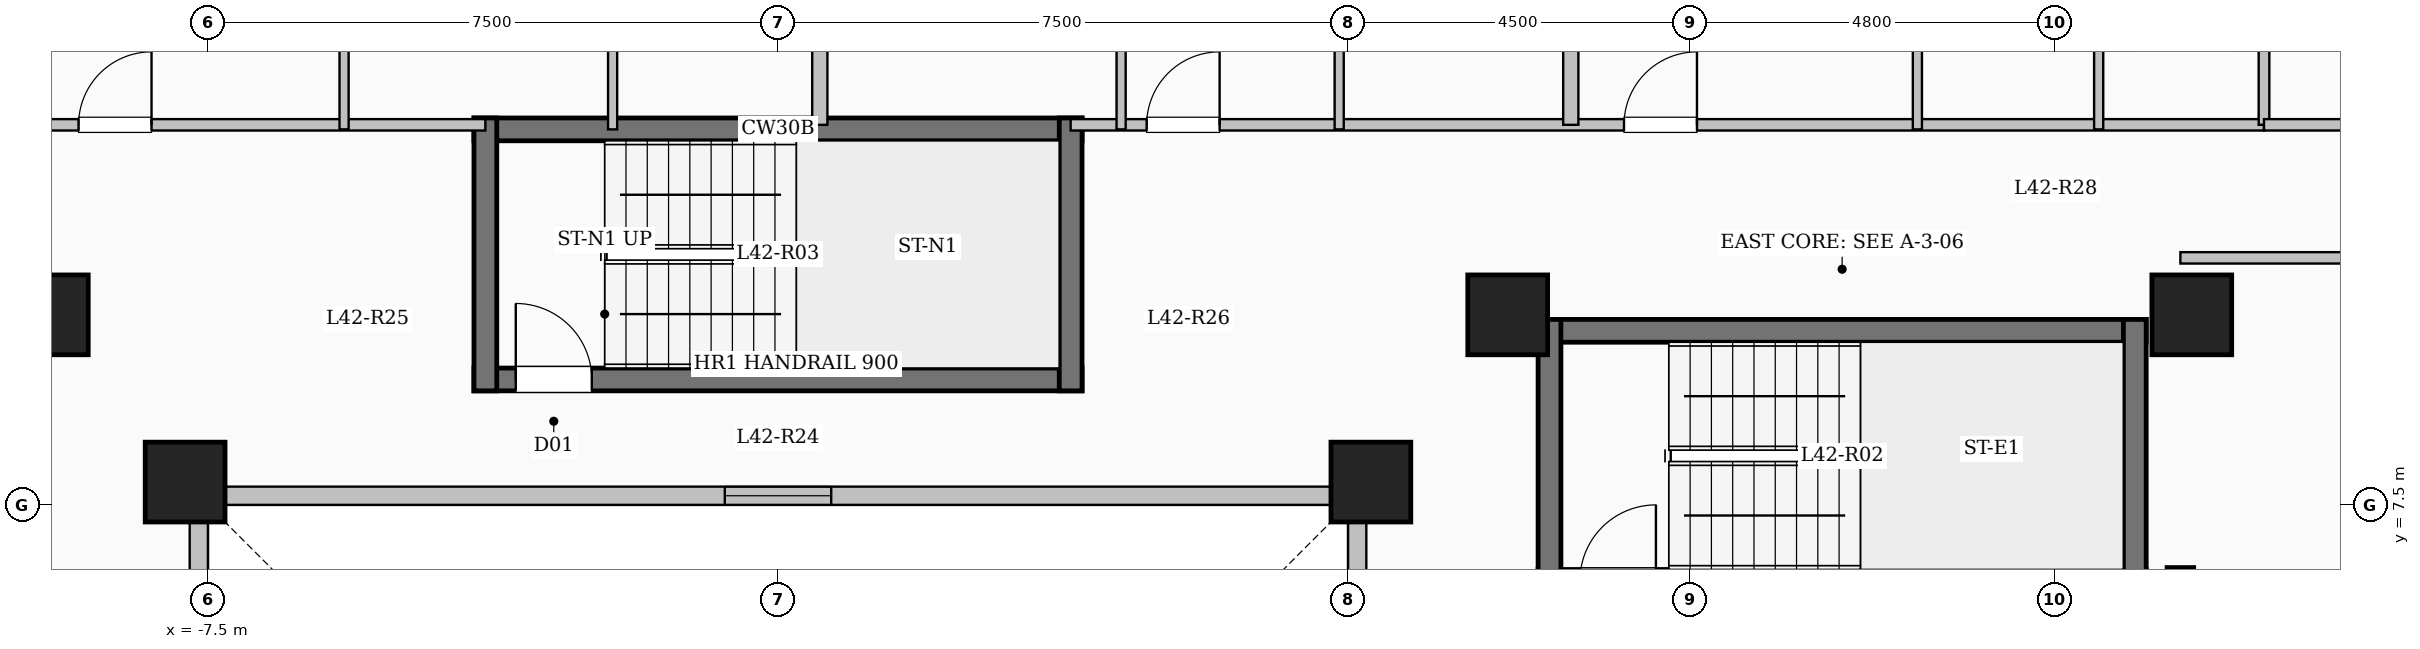
"""IFC4 building model, lengths in metres.
Left out: names, types, materials, properties, quantities, classifications, styles, units other than length and angle.
Written with IfcOpenShell. Run it as: python <this file> out.ifc"""

import sys

from ifc_helpers import new_model, si_unit, direction, frame, frame_2d, origin, origin_2d, place, context, subcontext, project, spatial, rectangle, extrude, element, fill, save


model = new_model("IFC4")
c1 = context("Model", 3, precision=1e-05, world=origin(), true_north=direction((0.0, 1.0)))
c2 = subcontext(c1, "Body", "Model", "MODEL_VIEW")
j1 = project(units=[si_unit("LENGTHUNIT", "METRE"), si_unit("PLANEANGLEUNIT", "RADIAN")], contexts=[c1])
p1 = place(None, origin())
s1 = spatial("IfcSite", under=j1, at=p1, CompositionType="ELEMENT")
p2 = place(p1, origin())
s2 = spatial("IfcBuilding", under=s1, at=p2, CompositionType="ELEMENT")
p3 = place(p2, frame((0.0, 0.0, 156.05)))
s3 = spatial("IfcBuildingStorey", under=s2, at=p3, CompositionType="ELEMENT", Elevation=156.05)
for number, where, z_axis, x_axis in (
    (1, (-7.8, 7.8, 0.0), (0.0, 0.0, 1.0), (1.0, 0.0, 0.0)),
    (2, (7.8, 7.8, 0.0), (0.0, 0.0, 1.0), (1.0, 0.0, 0.0)),
    (3, (-9.6, 10.0, 0.0), (0.0, 0.0, 1.0), (1.0, 0.0, 0.0)),
    (4, (9.6, 10.0, 0.0), (0.0, 0.0, 1.0), (1.0, 0.0, 0.0)),
    (5, (18.6, 10.0, 0.0), (0.0, 0.0, 1.0), (1.0, 0.0, 0.0)),
):
    element("IfcColumn", number, at=place(p3, frame(where, z_axis=z_axis, x_axis=x_axis)), inside=s3, PredefinedType="COLUMN", context=c2, shape_type="SweptSolid", body=[
        extrude(rectangle(XDim=1.05, YDim=1.05, at=origin_2d()), origin(), (0.0, 0.0, 1.0), 3.35),
    ])
p4 = place(p3, frame((7.62, -7.62, 0.0), z_axis=(0.0, 0.0, 1.0), x_axis=(0.0, 1.0, 0.0)))
e6 = element("IfcWall", 6, at=p4, inside=s3, PredefinedType="SOLIDWALL", context=c2, shape_type="SweptSolid", body=[
    extrude(rectangle(XDim=15.24, YDim=0.24, at=frame_2d((7.62, 0.0))), origin(), (0.0, 0.0, 1.0), 3.1),
])
p5 = place(p4, frame((6.92, 0.0, 0.95)))
e7 = element("IfcOpeningElement", 7, at=p5, cuts=e6, PredefinedType="OPENING", context=c2, shape_type="SweptSolid", body=[
    extrude(rectangle(XDim=1.4, YDim=1.5, at=frame_2d((0.7, 0.75))), frame((0.0, 0.13, 0.0), z_axis=(0.0, -1.0, 0.0), x_axis=(1.0, 0.0, 0.0)), (0.0, 0.0, 1.0), 0.26),
])
p6 = place(p3, frame((7.62, 7.62, 0.0), z_axis=(0.0, 0.0, 1.0), x_axis=(-1.0, 0.0, 0.0)))
e8 = element("IfcWall", 8, at=p6, inside=s3, PredefinedType="SOLIDWALL", context=c2, shape_type="SweptSolid", body=[
    extrude(rectangle(XDim=15.24, YDim=0.24, at=frame_2d((7.62, 0.0))), origin(), (0.0, 0.0, 1.0), 3.1),
])
p7 = place(p6, frame((6.92, 0.0, 0.95)))
e9 = element("IfcOpeningElement", 9, at=p7, cuts=e8, PredefinedType="OPENING", context=c2, shape_type="SweptSolid", body=[
    extrude(rectangle(XDim=1.4, YDim=1.5, at=frame_2d((0.7, 0.75))), frame((0.0, 0.13, 0.0), z_axis=(0.0, -1.0, 0.0), x_axis=(1.0, 0.0, 0.0)), (0.0, 0.0, 1.0), 0.26),
])
p8 = place(p3, frame((-7.62, 7.62, 0.0), z_axis=(0.0, 0.0, 1.0), x_axis=(0.0, -1.0, 0.0)))
e10 = element("IfcWall", 10, at=p8, inside=s3, PredefinedType="SOLIDWALL", context=c2, shape_type="SweptSolid", body=[
    extrude(rectangle(XDim=15.24, YDim=0.24, at=frame_2d((7.62, 0.0))), origin(), (0.0, 0.0, 1.0), 3.1),
])
p9 = place(p8, frame((6.92, 0.0, 0.95)))
e11 = element("IfcOpeningElement", 11, at=p9, cuts=e10, PredefinedType="OPENING", context=c2, shape_type="SweptSolid", body=[
    extrude(rectangle(XDim=1.4, YDim=1.5, at=frame_2d((0.7, 0.75))), frame((0.0, 0.13, 0.0), z_axis=(0.0, -1.0, 0.0), x_axis=(1.0, 0.0, 0.0)), (0.0, 0.0, 1.0), 0.26),
])
p10 = place(p3, frame((10.0, 9.79, 0.0), z_axis=(0.0, 0.0, 1.0), x_axis=(1.0, 0.0, 0.0)))
e12 = element("IfcWall", 12, at=p10, inside=s3, PredefinedType="SHEAR", context=c2, shape_type="SweptSolid", body=[
    extrude(rectangle(XDim=8.0, YDim=0.3, at=frame_2d((4.0, 0.0))), origin(), (0.0, 0.0, 1.0), 3.35),
])
p11 = place(p3, frame((10.0, 6.5, 0.0), z_axis=(0.0, 0.0, 1.0), x_axis=(1.0, 0.0, 0.0)))
e13 = element("IfcWall", 13, at=p11, inside=s3, PredefinedType="SHEAR", context=c2, shape_type="SweptSolid", body=[
    extrude(rectangle(XDim=8.0, YDim=0.3, at=frame_2d((4.0, 0.0))), origin(), (0.0, 0.0, 1.0), 3.35),
])
p12 = place(p11, frame((0.55, 0.0, 0.0)))
e14 = element("IfcOpeningElement", 14, at=p12, cuts=e13, PredefinedType="OPENING", context=c2, shape_type="SweptSolid", body=[
    extrude(rectangle(XDim=1.0, YDim=2.15, at=frame_2d((0.5, 1.075))), frame((0.0, 0.16, 0.0), z_axis=(0.0, -1.0, 0.0), x_axis=(1.0, 0.0, 0.0)), (0.0, 0.0, 1.0), 0.32),
])
for number, where, z_axis, x_axis in (
    (15, (10.15, 6.35, 0.0), (0.0, 0.0, 1.0), (0.0, 1.0, 0.0)),
    (16, (17.85, 6.35, 0.0), (0.0, 0.0, 1.0), (0.0, 1.0, 0.0)),
):
    element("IfcWall", number, at=place(p3, frame(where, z_axis=z_axis, x_axis=x_axis)), inside=s3, PredefinedType="SHEAR", context=c2, shape_type="SweptSolid", body=[
        extrude(rectangle(XDim=3.59, YDim=0.3, at=frame_2d((1.795, 0.0))), origin(), (0.0, 0.0, 1.0), 3.35),
    ])
p13 = place(p3, frame((-4.0, 12.44, 0.0), z_axis=(0.0, 0.0, 1.0), x_axis=(1.0, 0.0, 0.0)))
e17 = element("IfcWall", 17, at=p13, inside=s3, PredefinedType="SHEAR", context=c2, shape_type="SweptSolid", body=[
    extrude(rectangle(XDim=8.0, YDim=0.3, at=frame_2d((4.0, 0.0))), origin(), (0.0, 0.0, 1.0), 3.35),
])
p14 = place(p3, frame((-4.0, 9.15, 0.0), z_axis=(0.0, 0.0, 1.0), x_axis=(1.0, 0.0, 0.0)))
e18 = element("IfcWall", 18, at=p14, inside=s3, PredefinedType="SHEAR", context=c2, shape_type="SweptSolid", body=[
    extrude(rectangle(XDim=8.0, YDim=0.3, at=frame_2d((4.0, 0.0))), origin(), (0.0, 0.0, 1.0), 3.35),
])
p15 = place(p14, frame((0.55, 0.0, 0.0)))
e19 = element("IfcOpeningElement", 19, at=p15, cuts=e18, PredefinedType="OPENING", context=c2, shape_type="SweptSolid", body=[
    extrude(rectangle(XDim=1.0, YDim=2.15, at=frame_2d((0.5, 1.075))), frame((0.0, 0.16, 0.0), z_axis=(0.0, -1.0, 0.0), x_axis=(1.0, 0.0, 0.0)), (0.0, 0.0, 1.0), 0.32),
])
for number, where, z_axis, x_axis in (
    (20, (-3.85, 9.0, 0.0), (0.0, 0.0, 1.0), (0.0, 1.0, 0.0)),
    (21, (3.85, 9.0, 0.0), (0.0, 0.0, 1.0), (0.0, 1.0, 0.0)),
):
    element("IfcWall", number, at=place(p3, frame(where, z_axis=z_axis, x_axis=x_axis)), inside=s3, PredefinedType="SHEAR", context=c2, shape_type="SweptSolid", body=[
        extrude(rectangle(XDim=3.59, YDim=0.3, at=frame_2d((1.795, 0.0))), origin(), (0.0, 0.0, 1.0), 3.35),
    ])
p16 = place(p3, frame((18.45, -7.375, 0.0), z_axis=(0.0, 0.0, 1.0), x_axis=(0.0, 1.0, 0.0)))
e22 = element("IfcWall", 22, at=p16, inside=s3, PredefinedType="SHEAR", context=c2, shape_type="SweptSolid", body=[
    extrude(rectangle(XDim=14.05, YDim=0.35, at=frame_2d((7.025, 0.0))), origin(), (0.0, 0.0, 1.0), 3.35),
])
p17 = place(p3, frame((-19.55, 12.5, 0.0), z_axis=(0.0, 0.0, 1.0), x_axis=(1.0, 0.0, 0.0)))
e23 = element("IfcWall", 23, at=p17, inside=s3, PredefinedType="PARTITIONING", context=c2, shape_type="SweptSolid", body=[
    extrude(rectangle(XDim=15.7, YDim=0.15, at=frame_2d((7.85, 0.0))), origin(), (0.0, 0.0, 1.0), 3.1),
])
p18 = place(p17, frame((0.7, 0.0, 0.0)))
e24 = element("IfcOpeningElement", 24, at=p18, cuts=e23, PredefinedType="OPENING", context=c2, shape_type="SweptSolid", body=[
    extrude(rectangle(XDim=0.96, YDim=2.15, at=frame_2d((0.48, 1.075))), frame((0.0, 0.085, 0.0), z_axis=(0.0, -1.0, 0.0), x_axis=(1.0, 0.0, 0.0)), (0.0, 0.0, 1.0), 0.17),
])
p19 = place(p17, frame((10.348, 0.0, 0.0)))
e25 = element("IfcOpeningElement", 25, at=p19, cuts=e23, PredefinedType="OPENING", context=c2, shape_type="SweptSolid", body=[
    extrude(rectangle(XDim=0.96, YDim=2.15, at=frame_2d((0.48, 1.075))), frame((0.0, 0.085, 0.0), z_axis=(0.0, -1.0, 0.0), x_axis=(1.0, 0.0, 0.0)), (0.0, 0.0, 1.0), 0.17),
])
p20 = place(p3, frame((3.85, 12.5, 0.0), z_axis=(0.0, 0.0, 1.0), x_axis=(1.0, 0.0, 0.0)))
e26 = element("IfcWall", 26, at=p20, inside=s3, PredefinedType="PARTITIONING", context=c2, shape_type="SweptSolid", body=[
    extrude(rectangle(XDim=15.7, YDim=0.15, at=frame_2d((7.85, 0.0))), origin(), (0.0, 0.0, 1.0), 3.1),
])
p21 = place(p20, frame((1.0, 0.0, 0.0)))
e27 = element("IfcOpeningElement", 27, at=p21, cuts=e26, PredefinedType="OPENING", context=c2, shape_type="SweptSolid", body=[
    extrude(rectangle(XDim=0.96, YDim=2.15, at=frame_2d((0.48, 1.075))), frame((0.0, 0.085, 0.0), z_axis=(0.0, -1.0, 0.0), x_axis=(1.0, 0.0, 0.0)), (0.0, 0.0, 1.0), 0.17),
])
p22 = place(p20, frame((7.28, 0.0, 0.0)))
e28 = element("IfcOpeningElement", 28, at=p22, cuts=e26, PredefinedType="OPENING", context=c2, shape_type="SweptSolid", body=[
    extrude(rectangle(XDim=0.96, YDim=2.15, at=frame_2d((0.48, 1.075))), frame((0.0, 0.085, 0.0), z_axis=(0.0, -1.0, 0.0), x_axis=(1.0, 0.0, 0.0)), (0.0, 0.0, 1.0), 0.17),
])
p23 = place(p3, frame((0.55, 12.5, 0.0), z_axis=(0.0, 0.0, 1.0), x_axis=(0.0, 1.0, 0.0)))
e29 = element("IfcWall", 29, at=p23, inside=s3, PredefinedType="SOLIDWALL", context=c2, shape_type="SweptSolid", body=[
    extrude(rectangle(XDim=10.18, YDim=0.2, at=frame_2d((5.09, 0.0))), origin(), (0.0, 0.0, 1.0), 3.1),
])
p24 = place(p3, frame((-5.709, 12.44, 0.0), z_axis=(0.0, 0.0, 1.0), x_axis=(0.0, 1.0, 0.0)))
e30 = element("IfcWall", 30, at=p24, inside=s3, PredefinedType="PARTITIONING", context=c2, shape_type="SweptSolid", body=[
    extrude(rectangle(XDim=10.065, YDim=0.12, at=frame_2d((5.032, 0.0))), origin(), (0.0, 0.0, 1.0), 3.1),
])
p25 = place(p24, frame((3.075, 0.0, 0.0)))
e31 = element("IfcOpeningElement", 31, at=p25, cuts=e30, PredefinedType="OPENING", context=c2, shape_type="SweptSolid", body=[
    extrude(rectangle(XDim=1.08, YDim=2.15, at=frame_2d((0.54, 1.075))), frame((0.0, 0.07, 0.0), z_axis=(0.0, -1.0, 0.0), x_axis=(1.0, 0.0, 0.0)), (0.0, 0.0, 1.0), 0.14),
])
p26 = place(p3, frame((-2.176, 12.44, 0.0), z_axis=(0.0, 0.0, 1.0), x_axis=(0.0, 1.0, 0.0)))
e32 = element("IfcWall", 32, at=p26, inside=s3, PredefinedType="PARTITIONING", context=c2, shape_type="SweptSolid", body=[
    extrude(rectangle(XDim=2.79, YDim=0.12, at=frame_2d((1.395, 0.0))), origin(), (0.0, 0.0, 1.0), 3.1),
])
p27 = place(p3, frame((10.43, 12.5, 0.0), z_axis=(0.0, 0.0, 1.0), x_axis=(0.0, 1.0, 0.0)))
e33 = element("IfcWall", 33, at=p27, inside=s3, PredefinedType="SOLIDWALL", context=c2, shape_type="SweptSolid", body=[
    extrude(rectangle(XDim=8.841, YDim=0.2, at=frame_2d((4.42, 0.0))), origin(), (0.0, 0.0, 1.0), 3.1),
])
p28 = place(p3, frame((4.514, 12.44, 0.0), z_axis=(0.0, 0.0, 1.0), x_axis=(0.0, 1.0, 0.0)))
e34 = element("IfcWall", 34, at=p28, inside=s3, PredefinedType="PARTITIONING", context=c2, shape_type="SweptSolid", body=[
    extrude(rectangle(XDim=10.24, YDim=0.12, at=frame_2d((5.12, 0.0))), origin(), (0.0, 0.0, 1.0), 3.1),
])
p29 = place(p28, frame((3.245, 0.0, 0.0)))
e35 = element("IfcOpeningElement", 35, at=p29, cuts=e34, PredefinedType="OPENING", context=c2, shape_type="SweptSolid", body=[
    extrude(rectangle(XDim=1.08, YDim=2.15, at=frame_2d((0.54, 1.075))), frame((0.0, 0.07, 0.0), z_axis=(0.0, -1.0, 0.0), x_axis=(1.0, 0.0, 0.0)), (0.0, 0.0, 1.0), 0.14),
])
p30 = place(p3, frame((7.383, 12.44, 0.0), z_axis=(0.0, 0.0, 1.0), x_axis=(0.0, 1.0, 0.0)))
e36 = element("IfcWall", 36, at=p30, inside=s3, PredefinedType="PARTITIONING", context=c2, shape_type="SweptSolid", body=[
    extrude(rectangle(XDim=2.96, YDim=0.12, at=frame_2d((1.48, 0.0))), origin(), (0.0, 0.0, 1.0), 2.585),
])
p31 = place(p3, frame((14.99, 12.44, 0.0), z_axis=(0.0, 0.0, 1.0), x_axis=(0.0, 1.0, 0.0)))
e37 = element("IfcWall", 37, at=p31, inside=s3, PredefinedType="PARTITIONING", context=c2, shape_type="SweptSolid", body=[
    extrude(rectangle(XDim=8.76, YDim=0.12, at=frame_2d((4.38, 0.0))), origin(), (0.0, 0.0, 1.0), 2.585),
])
p32 = place(p31, frame((2.735, 0.0, 0.0)))
e38 = element("IfcOpeningElement", 38, at=p32, cuts=e37, PredefinedType="OPENING", context=c2, shape_type="SweptSolid", body=[
    extrude(rectangle(XDim=1.08, YDim=2.15, at=frame_2d((0.54, 1.075))), frame((0.0, 0.07, 0.0), z_axis=(0.0, -1.0, 0.0), x_axis=(1.0, 0.0, 0.0)), (0.0, 0.0, 1.0), 0.14),
])
p33 = place(p3, frame((17.375, 12.44, 0.0), z_axis=(0.0, 0.0, 1.0), x_axis=(0.0, 1.0, 0.0)))
e39 = element("IfcWall", 39, at=p33, inside=s3, PredefinedType="PARTITIONING", context=c2, shape_type="SweptSolid", body=[
    extrude(rectangle(XDim=2.45, YDim=0.12, at=frame_2d((1.225, 0.0))), origin(), (0.0, 0.0, 1.0), 3.1),
])
p34 = place(p3, frame((18.45, 10.75, 0.0), z_axis=(0.0, 0.0, 1.0), x_axis=(1.0, 0.0, 0.0)))
e40 = element("IfcWall", 40, at=p34, inside=s3, PredefinedType="PARTITIONING", context=c2, shape_type="SweptSolid", body=[
    extrude(rectangle(XDim=6.63, YDim=0.15, at=frame_2d((3.315, 0.0))), origin(), (0.0, 0.0, 1.0), 3.1),
])
p35 = place(p3, frame((19.55, 12.5, 0.0), z_axis=(0.0, 0.0, 1.0), x_axis=(0.0, 1.0, 0.0)))
e41 = element("IfcWall", 41, at=p35, inside=s3, PredefinedType="PARTITIONING", context=c2, shape_type="SweptSolid", body=[
    extrude(rectangle(XDim=4.75, YDim=0.14, at=frame_2d((2.375, 0.0))), origin(), (0.0, 0.0, 1.0), 3.1),
])
p36 = place(p3, frame((19.55, 12.5, 0.0), z_axis=(0.0, 0.0, 1.0), x_axis=(1.0, 0.0, 0.0)))
e42 = element("IfcWall", 42, at=p36, inside=s3, PredefinedType="PARTITIONING", context=c2, shape_type="SweptSolid", body=[
    extrude(rectangle(XDim=5.53, YDim=0.15, at=frame_2d((2.765, 0.0))), origin(), (0.0, 0.0, 1.0), 3.1),
])
p37 = place(p36, frame((2.29, 0.0, 0.0)))
e43 = element("IfcOpeningElement", 43, at=p37, cuts=e42, PredefinedType="OPENING", context=c2, shape_type="SweptSolid", body=[
    extrude(rectangle(XDim=0.95, YDim=2.15, at=frame_2d((0.475, 1.075))), frame((0.0, 0.085, 0.0), z_axis=(0.0, -1.0, 0.0), x_axis=(1.0, 0.0, 0.0)), (0.0, 0.0, 1.0), 0.17),
])
p38 = place(p7, origin())
e44 = element("IfcWindow", 44, at=p38, inside=s3, PartitioningType="SINGLE_PANEL", PredefinedType="WINDOW", context=c2, shape_type="SweptSolid", body=[
    extrude(rectangle(XDim=1.4, YDim=1.5, at=frame_2d((0.7, 0.75))), frame((0.0, 0.03, 0.0), z_axis=(0.0, -1.0, 0.0), x_axis=(1.0, 0.0, 0.0)), (0.0, 0.0, 1.0), 0.06),
])
fill(e9, e44)
p39 = place(p15, origin())
e45 = element("IfcDoor", 45, at=p39, inside=s3, OperationType="SINGLE_SWING_LEFT", PredefinedType="DOOR", context=c2, shape_type="SweptSolid", body=[
    extrude(rectangle(XDim=1.0, YDim=2.15, at=frame_2d((0.5, 1.075))), frame((0.0, 0.025, 0.0), z_axis=(0.0, -1.0, 0.0), x_axis=(1.0, 0.0, 0.0)), (0.0, 0.0, 1.0), 0.05),
])
fill(e19, e45)
p40 = place(p19, origin())
e46 = element("IfcDoor", 46, at=p40, inside=s3, OperationType="SINGLE_SWING_RIGHT", PredefinedType="DOOR", context=c2, shape_type="SweptSolid", body=[
    extrude(rectangle(XDim=0.96, YDim=2.15, at=frame_2d((0.48, 1.075))), frame((0.0, 0.025, 0.0), z_axis=(0.0, -1.0, 0.0), x_axis=(1.0, 0.0, 0.0)), (0.0, 0.0, 1.0), 0.05),
])
fill(e25, e46)
p41 = place(p21, origin())
e47 = element("IfcDoor", 47, at=p41, inside=s3, OperationType="SINGLE_SWING_RIGHT", PredefinedType="DOOR", context=c2, shape_type="SweptSolid", body=[
    extrude(rectangle(XDim=0.96, YDim=2.15, at=frame_2d((0.48, 1.075))), frame((0.0, 0.025, 0.0), z_axis=(0.0, -1.0, 0.0), x_axis=(1.0, 0.0, 0.0)), (0.0, 0.0, 1.0), 0.05),
])
fill(e27, e47)
p42 = place(p22, origin())
e48 = element("IfcDoor", 48, at=p42, inside=s3, OperationType="SINGLE_SWING_RIGHT", PredefinedType="DOOR", context=c2, shape_type="SweptSolid", body=[
    extrude(rectangle(XDim=0.96, YDim=2.15, at=frame_2d((0.48, 1.075))), frame((0.0, 0.025, 0.0), z_axis=(0.0, -1.0, 0.0), x_axis=(1.0, 0.0, 0.0)), (0.0, 0.0, 1.0), 0.05),
])
fill(e28, e48)
save(model, sys.argv[1])
